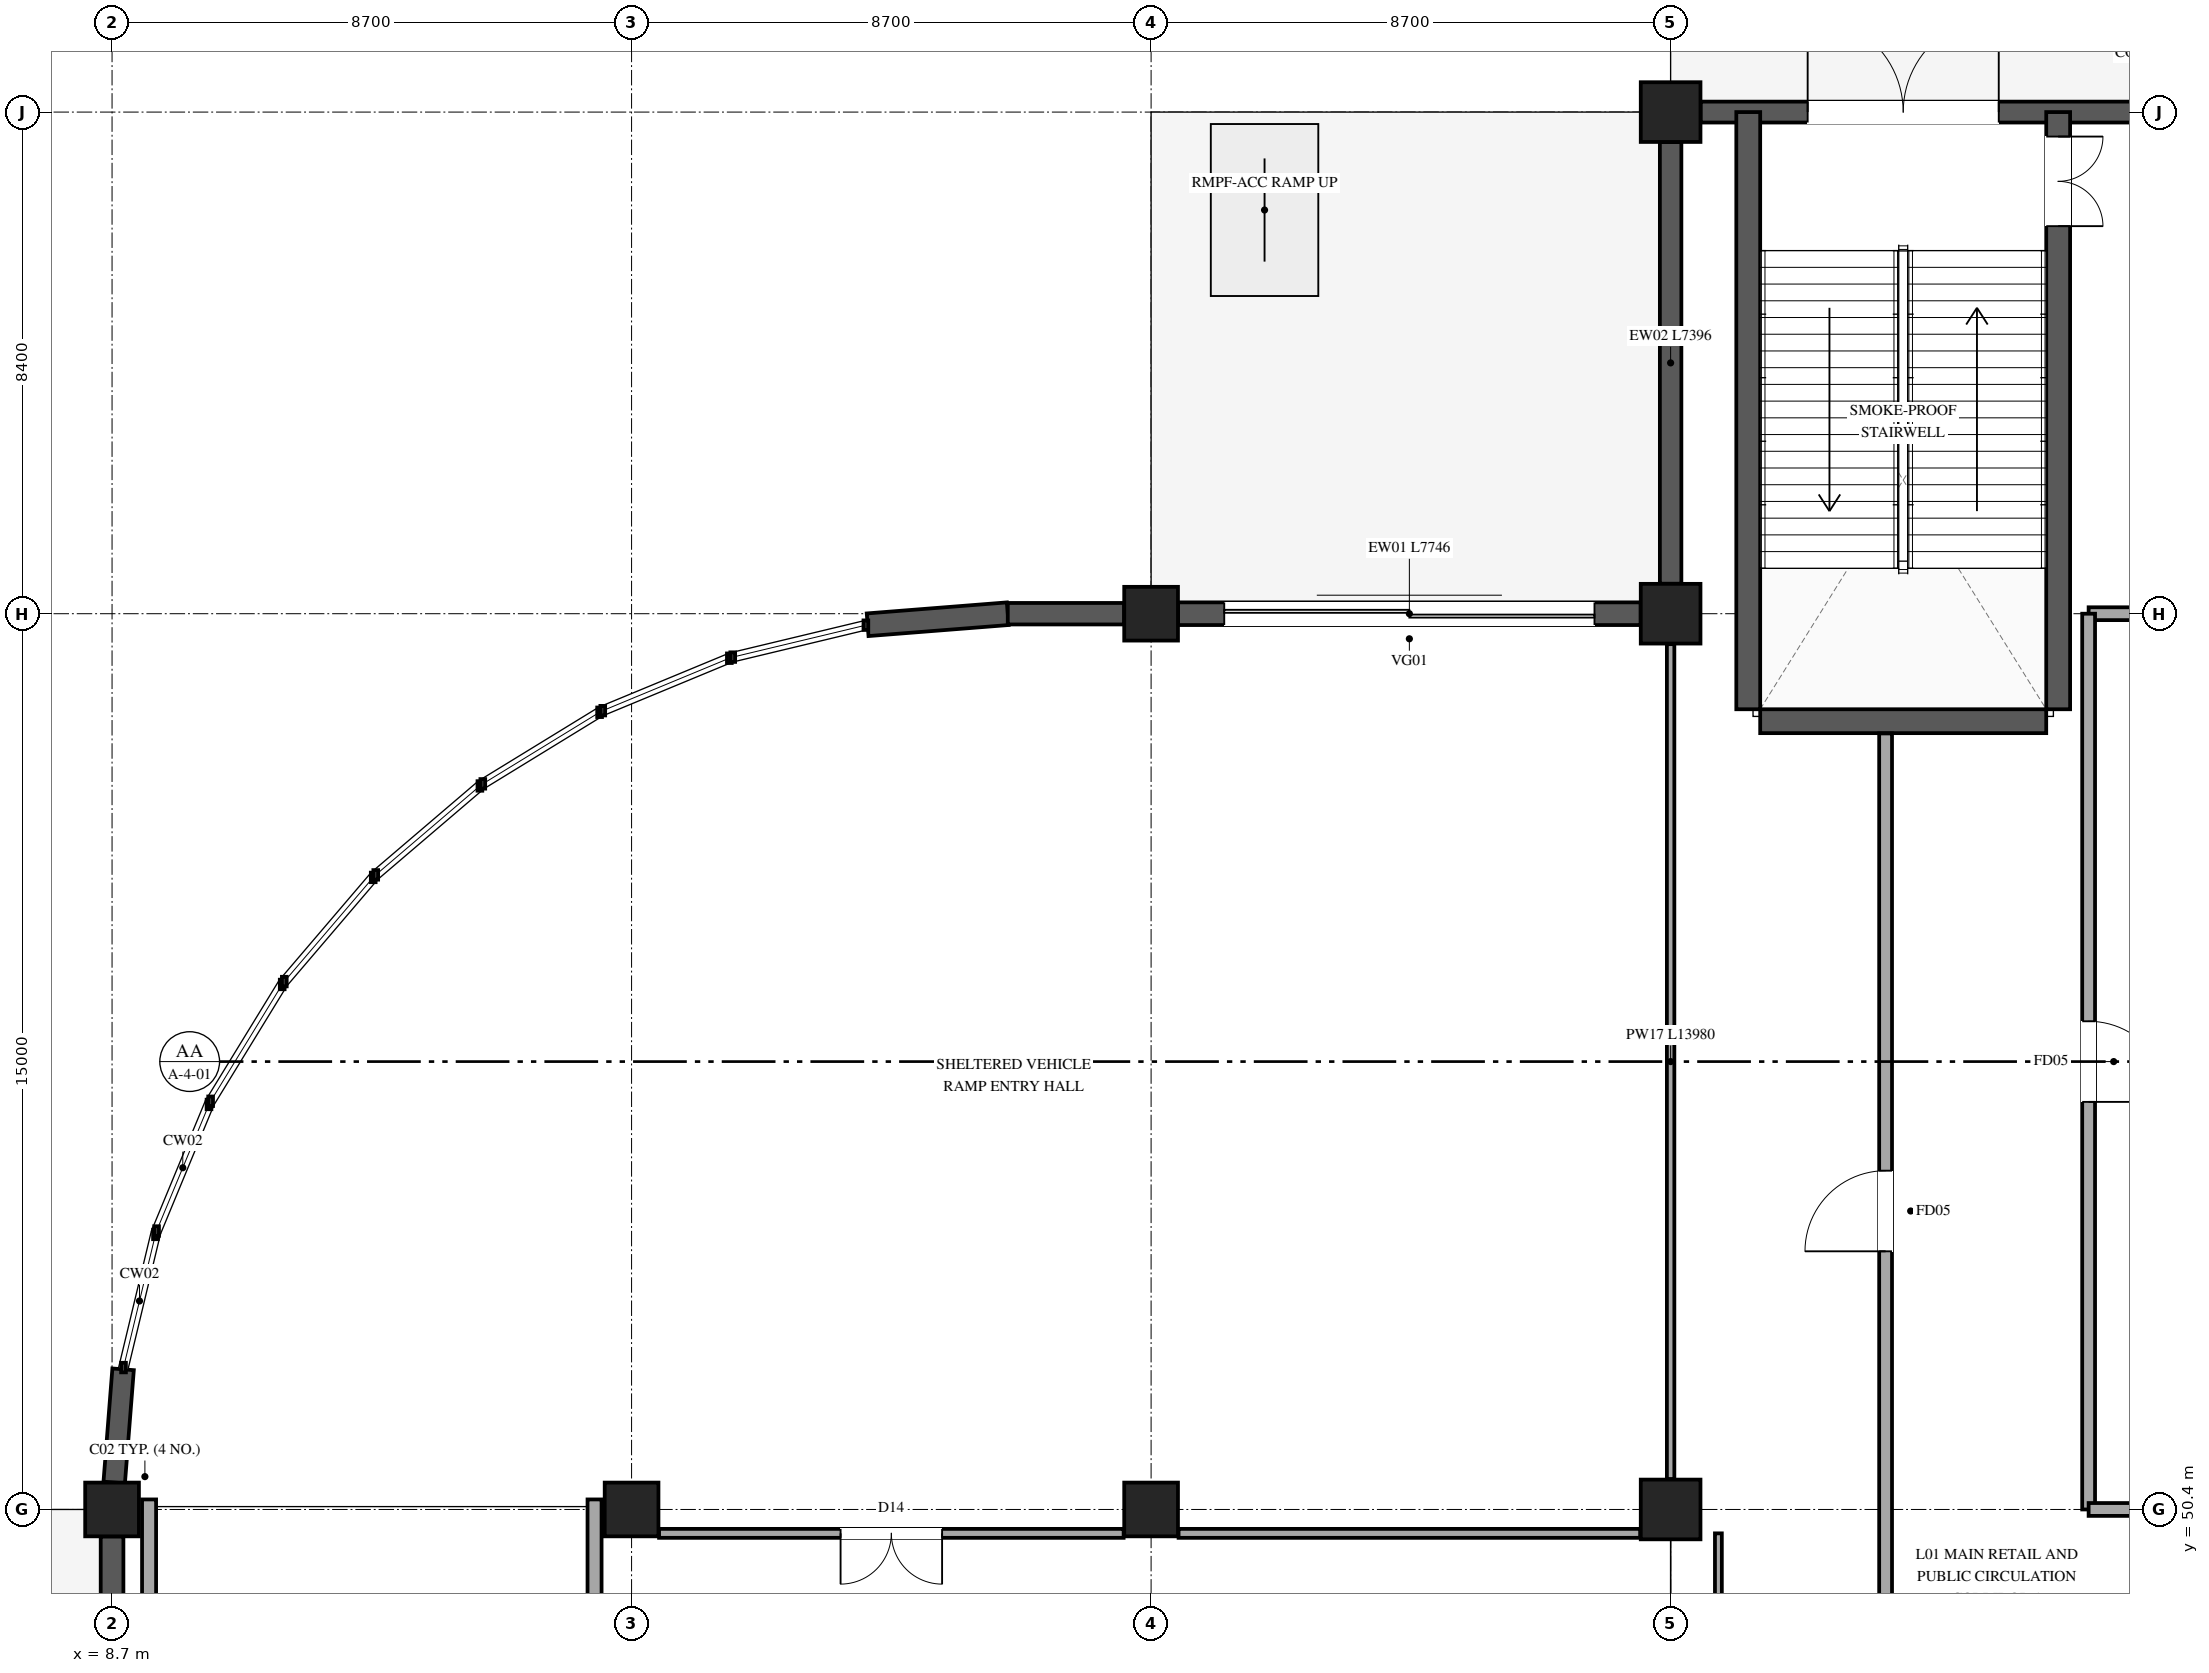
"""IFC4 building model, lengths in metres.
Left out: names, types, materials, properties, quantities, classifications, styles, units other than length and angle.
Written with IfcOpenShell. Run it as: python <this file> out.ifc"""

import sys

from ifc_helpers import new_model, si_unit, direction, frame, frame_2d, origin, origin_2d, place, context, subcontext, project, spatial, rectangle, extrude, element, fill, save


model = new_model("IFC4")
c1 = context("Model", 3, precision=1e-05, world=origin(), true_north=direction((0.0, 1.0)))
c2 = subcontext(c1, "Body", "Model", "MODEL_VIEW")
j1 = project(units=[si_unit("LENGTHUNIT", "METRE"), si_unit("PLANEANGLEUNIT", "RADIAN")], contexts=[c1])
p1 = place(None, origin())
s1 = spatial("IfcSite", under=j1, at=p1, CompositionType="ELEMENT")
p2 = place(p1, origin())
s2 = spatial("IfcBuilding", under=s1, at=p2, CompositionType="ELEMENT")
p3 = place(p2, origin())
s3 = spatial("IfcBuildingStorey", under=s2, at=p3, CompositionType="ELEMENT", Elevation=0.0)
for number, where, z_axis, x_axis in (
    (1, (8.7, 50.4, 0.0), (0.0, 0.0, 1.0), (1.0, 0.0, 0.0)),
    (2, (17.4, 50.4, 0.0), (0.0, 0.0, 1.0), (1.0, 0.0, 0.0)),
    (3, (26.1, 50.4, 0.0), (0.0, 0.0, 1.0), (1.0, 0.0, 0.0)),
    (4, (26.1, 65.4, 0.0), (0.0, 0.0, 1.0), (1.0, 0.0, 0.0)),
):
    element("IfcColumn", number, at=place(p3, frame(where, z_axis=z_axis, x_axis=x_axis)), inside=s3, PredefinedType="COLUMN", context=c2, shape_type="SweptSolid", body=[
        extrude(rectangle(XDim=0.9, YDim=0.9, at=origin_2d()), origin(), (0.0, 0.0, 1.0), 6.0),
    ])
for number, where, z_axis, x_axis in (
    (5, (34.8, 50.4, 0.0), (0.0, 0.0, 1.0), (1.0, 0.0, 0.0)),
    (6, (34.8, 65.4, 0.0), (0.0, 0.0, 1.0), (1.0, 0.0, 0.0)),
    (7, (34.8, 73.8, 0.0), (0.0, 0.0, 1.0), (1.0, 0.0, 0.0)),
):
    element("IfcColumn", number, at=place(p3, frame(where, z_axis=z_axis, x_axis=x_axis)), inside=s3, PredefinedType="COLUMN", context=c2, shape_type="SweptSolid", body=[
        extrude(rectangle(XDim=1.0, YDim=1.0, at=origin_2d()), origin(), (0.0, 0.0, 1.0), 6.0),
    ])
p4 = place(p3, frame((8.7, 42.502, 0.0), z_axis=(0.0, 0.0, 1.0), x_axis=(0.0, 1.0, 0.0)))
e8 = element("IfcWall", 8, at=p4, inside=s3, PredefinedType="STANDARD", context=c2, shape_type="SweptSolid", body=[
    extrude(rectangle(XDim=7.446, YDim=0.38, at=frame_2d((3.723, 0.0))), origin(), (0.0, 0.0, 1.0), 5.66),
])
p5 = place(p4, frame((1.923, 0.0, 0.0)))
e9 = element("IfcOpeningElement", 9, at=p5, cuts=e8, PredefinedType="OPENING", context=c2, shape_type="SweptSolid", body=[
    extrude(rectangle(XDim=3.6, YDim=2.6, at=frame_2d((1.8, 1.3))), frame((0.0, 0.2, 0.0), z_axis=(0.0, -1.0, 0.0), x_axis=(1.0, 0.0, 0.0)), (0.0, 0.0, 1.0), 0.4),
])
p6 = place(p3, frame((8.736, 50.851, 0.0), z_axis=(0.0, 0.0, 1.0), x_axis=(0.078306322526, 0.996929345467, 0.0)))
e10 = element("IfcWall", 10, at=p6, inside=s3, PredefinedType="STANDARD", context=c2, shape_type="SweptSolid", body=[
    extrude(rectangle(XDim=1.902, YDim=0.36, at=frame_2d((0.951, 0.0))), origin(), (0.0, 0.0, 1.0), 5.66),
])
p7 = place(p3, frame((21.353, 65.215, 0.0), z_axis=(0.0, 0.0, 1.0), x_axis=(0.996913759647, 0.078504495584, 0.0)))
e11 = element("IfcWall", 11, at=p7, inside=s3, PredefinedType="STANDARD", context=c2, shape_type="SweptSolid", body=[
    extrude(rectangle(XDim=2.354, YDim=0.38, at=frame_2d((1.177, 0.0))), origin(), (0.0, 0.0, 1.0), 5.66),
])
p8 = place(p3, frame((23.7, 65.4, 0.0), z_axis=(0.0, 0.0, 1.0), x_axis=(1.0, 0.0, 0.0)))
e12 = element("IfcWall", 12, at=p8, inside=s3, PredefinedType="STANDARD", context=c2, shape_type="SweptSolid", body=[
    extrude(rectangle(XDim=1.948, YDim=0.36, at=frame_2d((0.974, 0.0))), origin(), (0.0, 0.0, 1.0), 5.66),
])
p9 = place(p3, frame((26.552, 65.4, 0.0), z_axis=(0.0, 0.0, 1.0), x_axis=(1.0, 0.0, 0.0)))
e13 = element("IfcWall", 13, at=p9, inside=s3, PredefinedType="STANDARD", context=c2, shape_type="SweptSolid", body=[
    extrude(rectangle(XDim=7.746, YDim=0.38, at=frame_2d((3.873, 0.0))), origin(), (0.0, 0.0, 1.0), 5.66),
])
p10 = place(p9, frame((0.773, 0.0, 0.0)))
e14 = element("IfcOpeningElement", 14, at=p10, cuts=e13, PredefinedType="OPENING", context=c2, shape_type="SweptSolid", body=[
    extrude(rectangle(XDim=6.2, YDim=3.2, at=frame_2d((3.1, 1.6))), frame((0.0, 0.2, 0.0), z_axis=(0.0, -1.0, 0.0), x_axis=(1.0, 0.0, 0.0)), (0.0, 0.0, 1.0), 0.4),
])
p11 = place(p3, frame((34.8, 65.902, 0.0), z_axis=(0.0, 0.0, 1.0), x_axis=(0.0, 1.0, 0.0)))
e15 = element("IfcWall", 15, at=p11, inside=s3, PredefinedType="STANDARD", context=c2, shape_type="SweptSolid", body=[
    extrude(rectangle(XDim=7.396, YDim=0.36, at=frame_2d((3.698, 0.0))), origin(), (0.0, 0.0, 1.0), 5.66),
])
p12 = place(p3, frame((35.302, 73.8, 0.0), z_axis=(0.0, 0.0, 1.0), x_axis=(1.0, 0.0, 0.0)))
e16 = element("IfcWall", 16, at=p12, inside=s3, PredefinedType="STANDARD", context=c2, shape_type="SweptSolid", body=[
    extrude(rectangle(XDim=7.696, YDim=0.35, at=frame_2d((3.848, 0.0))), origin(), (0.0, 0.0, 1.0), 5.66),
])
p13 = place(p12, frame((1.793, 0.0, 0.0)))
e17 = element("IfcOpeningElement", 17, at=p13, cuts=e16, PredefinedType="OPENING", context=c2, shape_type="SweptSolid", body=[
    extrude(rectangle(XDim=3.2, YDim=2.4, at=frame_2d((1.6, 1.2))), frame((0.0, 0.185, 0.0), z_axis=(0.0, -1.0, 0.0), x_axis=(1.0, 0.0, 0.0)), (0.0, 0.0, 1.0), 0.37),
])
p14 = place(p3, frame((36.1, 63.8, 0.0), z_axis=(0.0, 0.0, 1.0), x_axis=(0.0, 1.0, 0.0)))
e18 = element("IfcWall", 18, at=p14, inside=s3, PredefinedType="SHEAR", context=c2, shape_type="SweptSolid", body=[
    extrude(rectangle(XDim=10.0, YDim=0.4, at=frame_2d((5.0, 0.0))), origin(), (0.0, 0.0, 1.0), 6.0),
])
p15 = place(p3, frame((41.29, 73.8, 0.0), z_axis=(0.0, 0.0, 1.0), x_axis=(0.0, -1.0, 0.0)))
e19 = element("IfcWall", 19, at=p15, inside=s3, PredefinedType="SHEAR", context=c2, shape_type="SweptSolid", body=[
    extrude(rectangle(XDim=10.0, YDim=0.4, at=frame_2d((5.0, 0.0))), origin(), (0.0, 0.0, 1.0), 6.0),
])
p16 = place(p15, frame((0.41, 0.0, 0.0)))
e20 = element("IfcOpeningElement", 20, at=p16, cuts=e19, PredefinedType="OPENING", context=c2, shape_type="SweptSolid", body=[
    extrude(rectangle(XDim=1.5, YDim=2.2, at=frame_2d((0.75, 1.1))), frame((0.0, 0.21, 0.0), z_axis=(0.0, -1.0, 0.0), x_axis=(1.0, 0.0, 0.0)), (0.0, 0.0, 1.0), 0.42),
])
p17 = place(p3, frame((41.09, 63.6, 0.0), z_axis=(0.0, 0.0, 1.0), x_axis=(-1.0, 0.0, 0.0)))
e21 = element("IfcWall", 21, at=p17, inside=s3, PredefinedType="SHEAR", context=c2, shape_type="SweptSolid", body=[
    extrude(rectangle(XDim=4.79, YDim=0.4, at=frame_2d((2.395, 0.0))), origin(), (0.0, 0.0, 1.0), 6.0),
])
p18 = place(p3, frame((34.29, 50.0, 0.0), z_axis=(0.0, 0.0, 1.0), x_axis=(-1.0, 0.0, 0.0)))
e22 = element("IfcWall", 22, at=p18, inside=s3, PredefinedType="PARTITIONING", context=c2, shape_type="SweptSolid", body=[
    extrude(rectangle(XDim=7.73, YDim=0.15, at=frame_2d((3.865, 0.0))), origin(), (0.0, 0.0, 1.0), 5.66),
])
p19 = place(p3, frame((25.64, 50.0, 0.0), z_axis=(0.0, 0.0, 1.0), x_axis=(-1.0, 0.0, 0.0)))
e23 = element("IfcWall", 23, at=p19, inside=s3, PredefinedType="PARTITIONING", context=c2, shape_type="SweptSolid", body=[
    extrude(rectangle(XDim=7.78, YDim=0.15, at=frame_2d((3.89, 0.0))), origin(), (0.0, 0.0, 1.0), 5.66),
])
p20 = place(p19, frame((3.04, 0.0, 0.0)))
e24 = element("IfcOpeningElement", 24, at=p20, cuts=e23, PredefinedType="OPENING", context=c2, shape_type="SweptSolid", body=[
    extrude(rectangle(XDim=1.7, YDim=2.2, at=frame_2d((0.85, 1.1))), frame((0.0, 0.085, 0.0), z_axis=(0.0, -1.0, 0.0), x_axis=(1.0, 0.0, 0.0)), (0.0, 0.0, 1.0), 0.17),
])
p21 = place(p3, frame((34.8, 64.89, 0.0), z_axis=(0.0, 0.0, 1.0), x_axis=(0.0, -1.0, 0.0)))
e25 = element("IfcWall", 25, at=p21, inside=s3, PredefinedType="PARTITIONING", context=c2, shape_type="SweptSolid", body=[
    extrude(rectangle(XDim=13.98, YDim=0.125, at=frame_2d((6.99, 0.0))), origin(), (0.0, 0.0, 1.0), 5.222),
])
p22 = place(p3, frame((38.4, 47.4, 0.0), z_axis=(0.0, 0.0, 1.0), x_axis=(0.0, 1.0, 0.0)))
e26 = element("IfcWall", 26, at=p22, inside=s3, PredefinedType="PARTITIONING", context=c2, shape_type="SweptSolid", body=[
    extrude(rectangle(XDim=15.995, YDim=0.215, at=frame_2d((7.998, 0.0))), origin(), (0.0, 0.0, 1.0), 4.91),
])
p23 = place(p22, frame((7.323, 0.0, 0.0)))
e27 = element("IfcOpeningElement", 27, at=p23, cuts=e26, PredefinedType="OPENING", context=c2, shape_type="SweptSolid", body=[
    extrude(rectangle(XDim=1.35, YDim=2.2, at=frame_2d((0.675, 1.1))), frame((0.0, 0.118, 0.0), z_axis=(0.0, -1.0, 0.0), x_axis=(1.0, 0.0, 0.0)), (0.0, 0.0, 1.0), 0.235),
])
p24 = place(p3, frame((42.99, 65.4, 0.0), z_axis=(0.0, 0.0, 1.0), x_axis=(-1.0, 0.0, 0.0)))
e28 = element("IfcWall", 28, at=p24, inside=s3, PredefinedType="PARTITIONING", context=c2, shape_type="SweptSolid", body=[
    extrude(rectangle(XDim=1.19, YDim=0.215, at=frame_2d((0.595, 0.0))), origin(), (0.0, 0.0, 1.0), 5.66),
])
p25 = place(p3, frame((41.8, 65.4, 0.0), z_axis=(0.0, 0.0, 1.0), x_axis=(0.0, -1.0, 0.0)))
e29 = element("IfcWall", 29, at=p25, inside=s3, PredefinedType="PARTITIONING", context=c2, shape_type="SweptSolid", body=[
    extrude(rectangle(XDim=15.0, YDim=0.215, at=frame_2d((7.5, 0.0))), origin(), (0.0, 0.0, 1.0), 4.91),
])
p26 = place(p25, frame((6.825, 0.0, 0.0)))
e30 = element("IfcOpeningElement", 30, at=p26, cuts=e29, PredefinedType="OPENING", context=c2, shape_type="SweptSolid", body=[
    extrude(rectangle(XDim=1.35, YDim=2.2, at=frame_2d((0.675, 1.1))), frame((0.0, 0.118, 0.0), z_axis=(0.0, -1.0, 0.0), x_axis=(1.0, 0.0, 0.0)), (0.0, 0.0, 1.0), 0.235),
])
p27 = place(p3, frame((41.8, 50.4, 0.0), z_axis=(0.0, 0.0, 1.0), x_axis=(1.0, 0.0, 0.0)))
e31 = element("IfcWall", 31, at=p27, inside=s3, PredefinedType="PARTITIONING", context=c2, shape_type="SweptSolid", body=[
    extrude(rectangle(XDim=1.19, YDim=0.215, at=frame_2d((0.595, 0.0))), origin(), (0.0, 0.0, 1.0), 4.91),
])
p28 = place(p3, frame((35.6, 50.0, 0.0), z_axis=(0.0, 0.0, 1.0), x_axis=(0.0, -1.0, 0.0)))
e32 = element("IfcWall", 32, at=p28, inside=s3, PredefinedType="PARTITIONING", context=c2, shape_type="SweptSolid", body=[
    extrude(rectangle(XDim=8.0, YDim=0.115, at=frame_2d((4.0, 0.0))), origin(), (0.0, 0.0, 1.0), 4.91),
])
for number, where, z_axis, x_axis in (
    (33, (9.32, 16.68, 0.0), (0.0, 0.0, 1.0), (0.0, 1.0, 0.0)),
    (34, (16.78, 16.68, 0.0), (0.0, 0.0, 1.0), (0.0, 1.0, 0.0)),
):
    element("IfcWall", number, at=place(p3, frame(where, z_axis=z_axis, x_axis=x_axis)), inside=s3, PredefinedType="PARTITIONING", context=c2, shape_type="SweptSolid", body=[
        extrude(rectangle(XDim=33.888, YDim=0.235, at=frame_2d((16.944, 0.0))), origin(), (0.0, 0.0, 1.0), 1.25),
    ])
p29 = place(p10, origin())
e35 = element("IfcDoor", 35, at=p29, inside=s3, OperationType="DOUBLE_DOOR_SLIDING", PredefinedType="GATE", context=c2, shape_type="SweptSolid", body=[
    extrude(rectangle(XDim=6.2, YDim=3.2, at=frame_2d((3.1, 1.6))), frame((0.0, 0.025, 0.0), z_axis=(0.0, -1.0, 0.0), x_axis=(1.0, 0.0, 0.0)), (0.0, 0.0, 1.0), 0.05),
])
fill(e14, e35)
p30 = place(p13, origin())
e36 = element("IfcDoor", 36, at=p30, inside=s3, OperationType="DOUBLE_DOOR_SINGLE_SWING", PredefinedType="USERDEFINED", context=c2, shape_type="SweptSolid", body=[
    extrude(rectangle(XDim=3.2, YDim=2.4, at=frame_2d((1.6, 1.2))), frame((0.0, 0.025, 0.0), z_axis=(0.0, -1.0, 0.0), x_axis=(1.0, 0.0, 0.0)), (0.0, 0.0, 1.0), 0.05),
])
fill(e17, e36)
p31 = place(p16, origin())
e37 = element("IfcDoor", 37, at=p31, inside=s3, OperationType="DOUBLE_DOOR_SINGLE_SWING", PredefinedType="DOOR", context=c2, shape_type="SweptSolid", body=[
    extrude(rectangle(XDim=1.5, YDim=2.2, at=frame_2d((0.75, 1.1))), frame((0.0, 0.025, 0.0), z_axis=(0.0, -1.0, 0.0), x_axis=(1.0, 0.0, 0.0)), (0.0, 0.0, 1.0), 0.05),
])
fill(e20, e37)
p32 = place(p23, origin())
e38 = element("IfcDoor", 38, at=p32, inside=s3, OperationType="SINGLE_SWING_LEFT", PredefinedType="DOOR", context=c2, shape_type="SweptSolid", body=[
    extrude(rectangle(XDim=1.35, YDim=2.2, at=frame_2d((0.675, 1.1))), frame((0.0, 0.025, 0.0), z_axis=(0.0, -1.0, 0.0), x_axis=(1.0, 0.0, 0.0)), (0.0, 0.0, 1.0), 0.05),
])
fill(e27, e38)
p33 = place(p26, origin())
e39 = element("IfcDoor", 39, at=p33, inside=s3, OperationType="SINGLE_SWING_RIGHT", PredefinedType="DOOR", context=c2, shape_type="SweptSolid", body=[
    extrude(rectangle(XDim=1.35, YDim=2.2, at=frame_2d((0.675, 1.1))), frame((0.0, 0.025, 0.0), z_axis=(0.0, -1.0, 0.0), x_axis=(1.0, 0.0, 0.0)), (0.0, 0.0, 1.0), 0.05),
])
fill(e30, e39)
p34 = place(p20, origin())
e40 = element("IfcDoor", 40, at=p34, inside=s3, OperationType="DOUBLE_DOOR_SINGLE_SWING", PredefinedType="DOOR", context=c2, shape_type="SweptSolid", body=[
    extrude(rectangle(XDim=1.7, YDim=2.2, at=frame_2d((0.85, 1.1))), frame((0.0, 0.025, 0.0), z_axis=(0.0, -1.0, 0.0), x_axis=(1.0, 0.0, 0.0)), (0.0, 0.0, 1.0), 0.05),
])
fill(e24, e40)
save(model, sys.argv[1])
